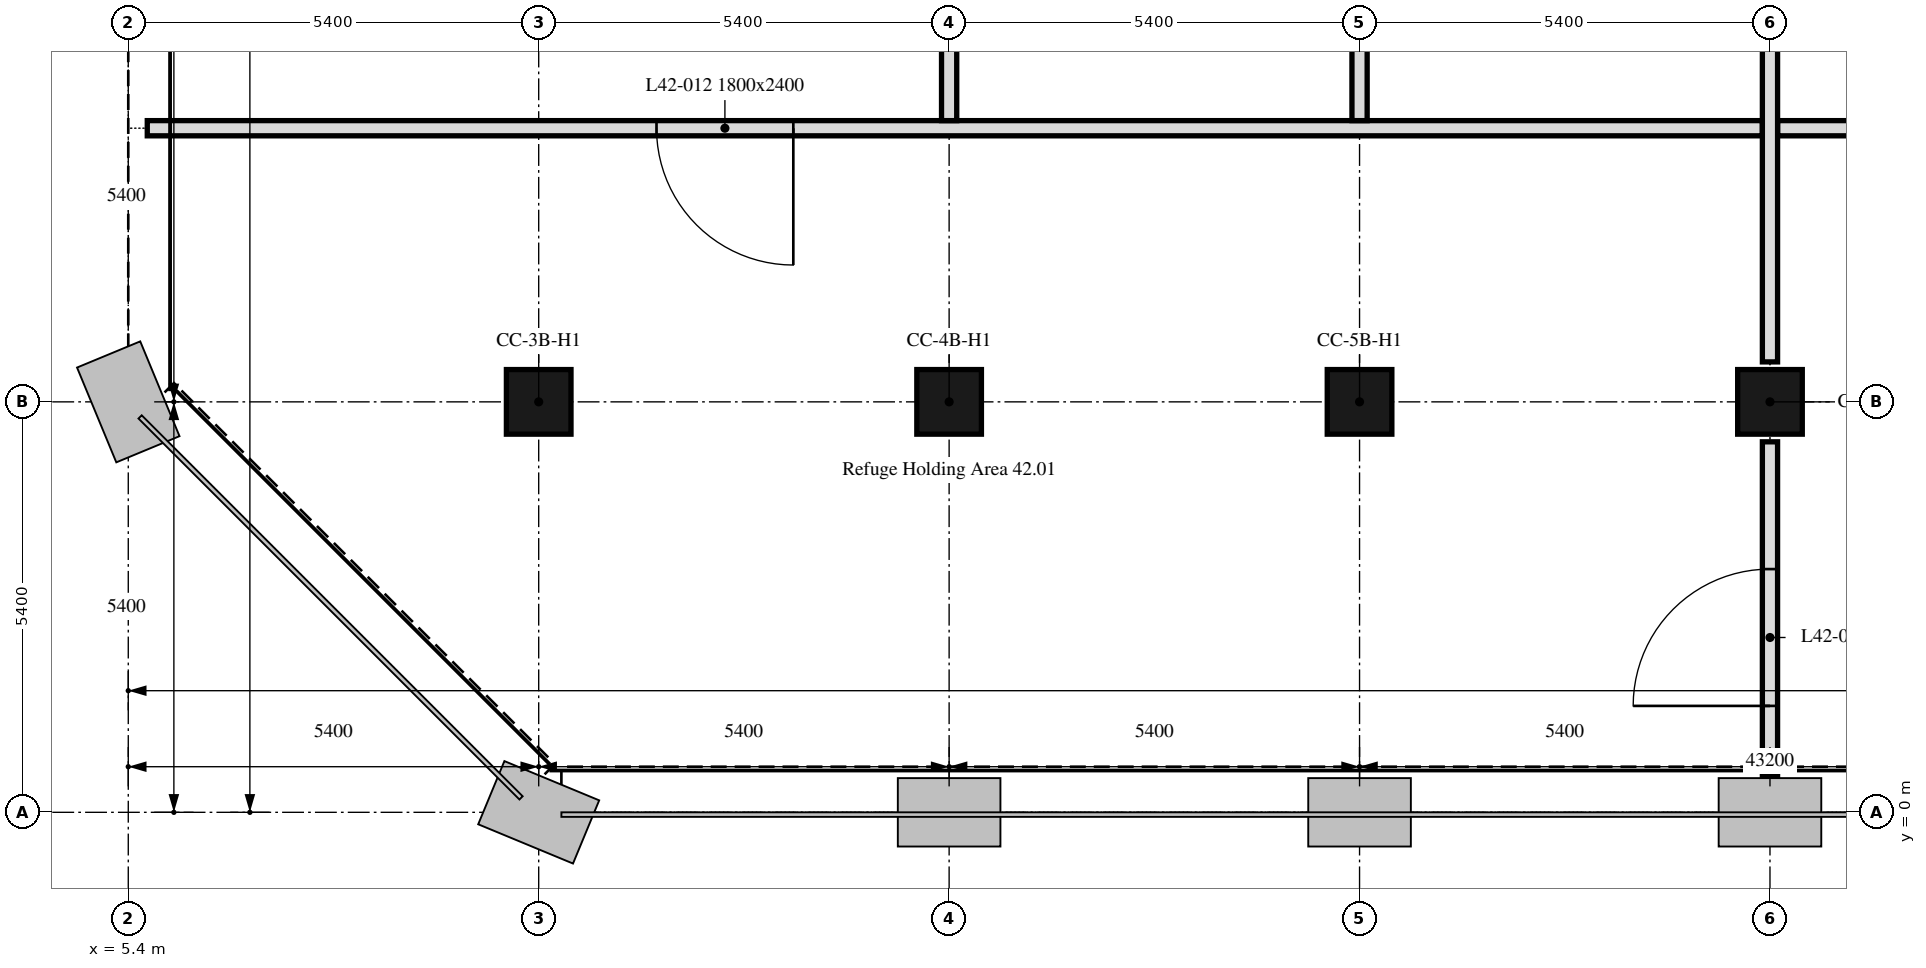
"""IFC4 building model, lengths in metres.
Left out: names, types, materials, properties, quantities, classifications, styles, units other than length and angle.
Written with IfcOpenShell. Run it as: python <this file> out.ifc"""

import sys

from ifc_helpers import new_model, si_unit, direction, frame, frame_2d, origin, origin_2d, place, context, subcontext, project, spatial, rectangle, extrude, element, fill, save


model = new_model("IFC4")
c1 = context("Model", 3, precision=1e-05, world=origin(), true_north=direction((0.0, 1.0)))
c2 = subcontext(c1, "Body", "Model", "MODEL_VIEW")
j1 = project(units=[si_unit("LENGTHUNIT", "METRE"), si_unit("PLANEANGLEUNIT", "RADIAN")], contexts=[c1])
p1 = place(None, origin())
s1 = spatial("IfcSite", under=j1, at=p1, CompositionType="ELEMENT")
p2 = place(p1, origin())
s2 = spatial("IfcBuilding", under=s1, at=p2, CompositionType="ELEMENT")
p3 = place(p2, frame((0.0, 0.0, 175.9)))
s3 = spatial("IfcBuildingStorey", under=s2, at=p3, CompositionType="ELEMENT", Elevation=175.9)
for number, where, z_axis, x_axis in (
    (1, (10.8, 5.4, 0.0), (0.0, 0.0, 1.0), (1.0, 0.0, 0.0)),
    (2, (16.2, 5.4, 0.0), (0.0, 0.0, 1.0), (1.0, 0.0, 0.0)),
    (3, (21.6, 5.4, 0.0), (0.0, 0.0, 1.0), (1.0, 0.0, 0.0)),
    (4, (27.0, 5.4, 0.0), (0.0, 0.0, 1.0), (1.0, 0.0, 0.0)),
):
    element("IfcColumn", number, at=place(p3, frame(where, z_axis=z_axis, x_axis=x_axis)), inside=s3, PredefinedType="COLUMN", context=c2, shape_type="SweptSolid", body=[
        extrude(rectangle(XDim=0.85, YDim=0.85, at=origin_2d()), origin(), (0.0, 0.0, 1.0), 4.5),
    ])
p4 = place(p3, frame((27.0, 0.48, 0.0), z_axis=(0.0, 0.0, 1.0), x_axis=(0.0, 1.0, 0.0)))
e5 = element("IfcWall", 5, at=p4, inside=s3, PredefinedType="PARTITIONING", context=c2, shape_type="SweptSolid", body=[
    extrude(rectangle(XDim=4.394, YDim=0.2, at=frame_2d((2.197, 0.0))), origin(), (0.0, 0.0, 1.0), 3.9),
])
p5 = place(p4, frame((0.92, 0.0, 0.0)))
e6 = element("IfcOpeningElement", 6, at=p5, cuts=e5, PredefinedType="OPENING", context=c2, shape_type="SweptSolid", body=[
    extrude(rectangle(XDim=1.8, YDim=2.4, at=frame_2d((0.9, 1.2))), frame((0.0, 0.1, 0.0), z_axis=(0.0, -1.0, 0.0), x_axis=(1.0, 0.0, 0.0)), (0.0, 0.0, 1.0), 0.2),
])
p6 = place(p3, frame((26.9, 9.0, 0.0), z_axis=(0.0, 0.0, 1.0), x_axis=(-1.0, 0.0, 0.0)))
e7 = element("IfcWall", 7, at=p6, inside=s3, PredefinedType="PARTITIONING", context=c2, shape_type="SweptSolid", body=[
    extrude(rectangle(XDim=21.25, YDim=0.2, at=frame_2d((10.625, 0.0))), origin(), (0.0, 0.0, 1.0), 3.9),
])
p7 = place(p6, frame((12.75, 0.0, 0.0)))
e8 = element("IfcOpeningElement", 8, at=p7, cuts=e7, PredefinedType="OPENING", context=c2, shape_type="SweptSolid", body=[
    extrude(rectangle(XDim=1.8, YDim=2.4, at=frame_2d((0.9, 1.2))), frame((0.0, 0.1, 0.0), z_axis=(0.0, -1.0, 0.0), x_axis=(1.0, 0.0, 0.0)), (0.0, 0.0, 1.0), 0.2),
])
p8 = place(p3, frame((43.1, 9.0, 0.0), z_axis=(0.0, 0.0, 1.0), x_axis=(-1.0, 0.0, 0.0)))
e9 = element("IfcWall", 9, at=p8, inside=s3, PredefinedType="PARTITIONING", context=c2, shape_type="SweptSolid", body=[
    extrude(rectangle(XDim=16.0, YDim=0.2, at=frame_2d((8.0, 0.0))), origin(), (0.0, 0.0, 1.0), 3.9),
])
p9 = place(p8, frame((1.95, 0.0, 0.0)))
e10 = element("IfcOpeningElement", 10, at=p9, cuts=e9, PredefinedType="OPENING", context=c2, shape_type="SweptSolid", body=[
    extrude(rectangle(XDim=1.8, YDim=2.4, at=frame_2d((0.9, 1.2))), frame((0.0, 0.1, 0.0), z_axis=(0.0, -1.0, 0.0), x_axis=(1.0, 0.0, 0.0)), (0.0, 0.0, 1.0), 0.2),
])
for number, where, z_axis, x_axis in (
    (11, (16.2, 9.1, 0.0), (0.0, 0.0, 1.0), (0.0, 1.0, 0.0)),
    (12, (21.6, 9.1, 0.0), (0.0, 0.0, 1.0), (0.0, 1.0, 0.0)),
):
    element("IfcWall", number, at=place(p3, frame(where, z_axis=z_axis, x_axis=x_axis)), inside=s3, PredefinedType="PARTITIONING", context=c2, shape_type="SweptSolid", body=[
        extrude(rectangle(XDim=1.174, YDim=0.2, at=frame_2d((0.587, 0.0))), origin(), (0.0, 0.0, 1.0), 3.9),
    ])
p10 = place(p3, frame((27.0, 5.926, 0.0), z_axis=(0.0, 0.0, 1.0), x_axis=(0.0, 1.0, 0.0)))
e13 = element("IfcWall", 13, at=p10, inside=s3, PredefinedType="PARTITIONING", context=c2, shape_type="SweptSolid", body=[
    extrude(rectangle(XDim=4.349, YDim=0.2, at=frame_2d((2.174, 0.0))), origin(), (0.0, 0.0, 1.0), 3.9),
])
p11 = place(p5, origin())
e14 = element("IfcDoor", 14, at=p11, inside=s3, OperationType="DOUBLE_DOOR_SINGLE_SWING", PredefinedType="DOOR", context=c2, shape_type="SweptSolid", body=[
    extrude(rectangle(XDim=1.8, YDim=2.4, at=frame_2d((0.9, 1.2))), frame((0.0, 0.025, 0.0), z_axis=(0.0, -1.0, 0.0), x_axis=(1.0, 0.0, 0.0)), (0.0, 0.0, 1.0), 0.05),
])
fill(e6, e14)
p12 = place(p7, origin())
e15 = element("IfcDoor", 15, at=p12, inside=s3, OperationType="DOUBLE_DOOR_SINGLE_SWING", PredefinedType="DOOR", context=c2, shape_type="SweptSolid", body=[
    extrude(rectangle(XDim=1.8, YDim=2.4, at=frame_2d((0.9, 1.2))), frame((0.0, 0.025, 0.0), z_axis=(0.0, -1.0, 0.0), x_axis=(1.0, 0.0, 0.0)), (0.0, 0.0, 1.0), 0.05),
])
fill(e8, e15)
save(model, sys.argv[1])
